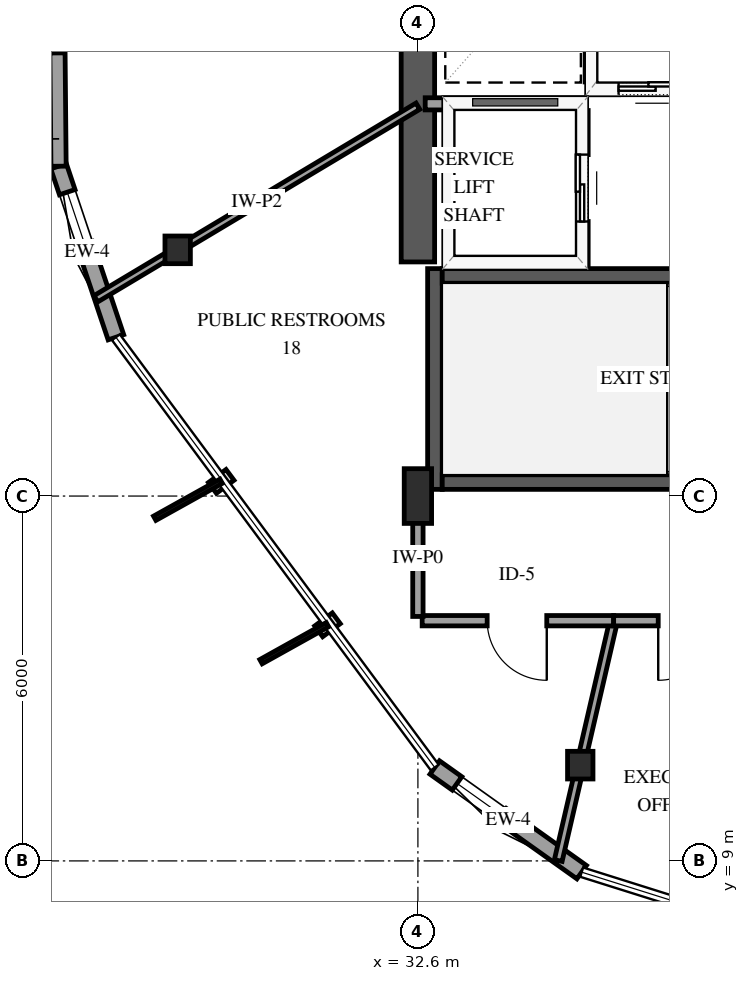
"""IFC4 building model, lengths in metres.
Left out: names, types, materials, properties, quantities, classifications, styles, units other than length and angle.
Written with IfcOpenShell. Run it as: python <this file> out.ifc"""

import sys

from ifc_helpers import new_model, si_unit, direction, frame, frame_2d, origin, origin_2d, place, context, subcontext, project, spatial, rectangle, i_section, extrude, element, fill, save


model = new_model("IFC4")
c1 = context("Model", 3, precision=1e-05, world=origin(), true_north=direction((0.0, 1.0)))
c2 = subcontext(c1, "Body", "Model", "MODEL_VIEW")
j1 = project(units=[si_unit("LENGTHUNIT", "METRE"), si_unit("PLANEANGLEUNIT", "RADIAN")], contexts=[c1])
p1 = place(None, origin())
s1 = spatial("IfcSite", under=j1, at=p1, CompositionType="ELEMENT")
p2 = place(p1, origin())
s2 = spatial("IfcBuilding", under=s1, at=p2, CompositionType="ELEMENT")
p3 = place(p2, frame((0.0, 0.0, 103.0)))
s3 = spatial("IfcBuildingStorey", under=s2, at=p3, CompositionType="ELEMENT", Elevation=103.0)
p4 = place(p3, frame((32.88, 15.11, 0.0), z_axis=(0.0, 0.0, 1.0), x_axis=(0.0, 1.0, 0.0)))
e1 = element("IfcWall", 1, at=p4, inside=s3, PredefinedType="SHEAR", context=c2, shape_type="SweptSolid", body=[
    extrude(rectangle(XDim=3.63, YDim=0.24, at=frame_2d((1.815, 0.0))), origin(), (0.0, 0.0, 1.0), 3.9),
])
for number, where, z_axis, x_axis in (
    (2, (33.0, 15.23, 0.0), (0.0, 0.0, 1.0), (1.0, 0.0, 0.0)),
    (3, (33.0, 18.62, 0.0), (0.0, 0.0, 1.0), (1.0, 0.0, 0.0)),
):
    element("IfcWall", number, at=place(p3, frame(where, z_axis=z_axis, x_axis=x_axis)), inside=s3, PredefinedType="SHEAR", context=c2, shape_type="SweptSolid", body=[
        extrude(rectangle(XDim=8.0, YDim=0.24, at=frame_2d((4.0, 0.0))), origin(), (0.0, 0.0, 1.0), 3.9),
    ])
p5 = place(p3, frame((32.6, 18.85, 0.0), z_axis=(0.0, 0.0, 1.0), x_axis=(0.0, 1.0, 0.0)))
e4 = element("IfcWall", 4, at=p5, inside=s3, PredefinedType="SHEAR", context=c2, shape_type="SweptSolid", body=[
    extrude(rectangle(XDim=12.3, YDim=0.55, at=frame_2d((6.15, 0.0))), origin(), (0.0, 0.0, 1.0), 3.9),
])
p6 = place(p3, frame((32.6, 15.0, 0.0), z_axis=(0.0, 0.0, 1.0), x_axis=(1.0, 0.0, 0.0)))
e5 = element("IfcColumn", 5, at=p6, inside=s3, PredefinedType="PILASTER", context=c2, shape_type="SweptSolid", body=[
    extrude(rectangle(XDim=0.45, YDim=0.9, at=origin_2d()), origin(), (0.0, 0.0, 1.0), 3.9),
])
for number, where, z_axis, x_axis in (
    (6, (28.649, 19.049, 0.0), (0.0, 0.0, 1.0), (1.0, 0.0, 0.0)),
    (7, (35.27, 10.575, 0.0), (0.0, 0.0, 1.0), (1.0, 0.0, 0.0)),
):
    element("IfcColumn", number, at=place(p3, frame(where, z_axis=z_axis, x_axis=x_axis)), inside=s3, PredefinedType="COLUMN", context=c2, shape_type="SweptSolid", body=[
        extrude(i_section(OverallWidth=0.418, OverallDepth=0.455, WebThickness=0.042, FlangeThickness=0.068, FilletRadius=0.038, at=origin_2d()), origin(), (0.0, 0.0, 1.0), 3.9),
    ])
p7 = place(p3, frame((26.69, 20.424, 0.0), z_axis=(0.0, 0.0, 1.0), x_axis=(0.317980066672, -0.948097398583, 0.0)))
e8 = element("IfcWall", 8, at=p7, inside=s3, PredefinedType="SOLIDWALL", context=c2, shape_type="SweptSolid", body=[
    extrude(rectangle(XDim=2.967, YDim=0.27, at=frame_2d((1.483, 0.0))), origin(), (0.0, 0.0, 1.0), 2.979),
])
p8 = place(p7, frame((0.45, 0.0, 0.75)))
e9 = element("IfcOpeningElement", 9, at=p8, cuts=e8, PredefinedType="OPENING", context=c2, shape_type="SweptSolid", body=[
    extrude(rectangle(XDim=0.9, YDim=1.5, at=frame_2d((0.45, 0.75))), frame((0.0, 0.145, 0.0), z_axis=(0.0, -1.0, 0.0), x_axis=(1.0, 0.0, 0.0)), (0.0, 0.0, 1.0), 0.29),
])
p9 = place(p3, frame((26.607, 29.23, 0.0), z_axis=(0.0, 0.0, 1.0), x_axis=(0.009425958451, -0.999955574667, 0.0)))
e10 = element("IfcWall", 10, at=p9, inside=s3, PredefinedType="SOLIDWALL", context=c2, shape_type="SweptSolid", body=[
    extrude(rectangle(XDim=8.806, YDim=0.25, at=frame_2d((4.403, 0.0))), origin(), (0.0, 0.0, 1.0), 2.979),
])
p10 = place(p9, frame((3.903, 0.0, 0.0)))
e11 = element("IfcOpeningElement", 11, at=p10, cuts=e10, PredefinedType="OPENING", context=c2, shape_type="SweptSolid", body=[
    extrude(rectangle(XDim=1.05, YDim=2.15, at=frame_2d((0.525, 1.075))), frame((0.0, 0.135, 0.0), z_axis=(0.0, -1.0, 0.0), x_axis=(1.0, 0.0, 0.0)), (0.0, 0.0, 1.0), 0.27),
])
p11 = place(p9, frame((0.44, 0.0, 0.72)))
e12 = element("IfcOpeningElement", 12, at=p11, cuts=e10, PredefinedType="OPENING", context=c2, shape_type="SweptSolid", body=[
    extrude(rectangle(XDim=1.35, YDim=1.65, at=frame_2d((0.675, 0.825))), frame((0.0, 0.135, 0.0), z_axis=(0.0, -1.0, 0.0), x_axis=(1.0, 0.0, 0.0)), (0.0, 0.0, 1.0), 0.27),
])
p12 = place(p9, frame((5.593, 0.0, 0.72)))
e13 = element("IfcOpeningElement", 13, at=p12, cuts=e10, PredefinedType="OPENING", context=c2, shape_type="SweptSolid", body=[
    extrude(rectangle(XDim=1.35, YDim=1.65, at=frame_2d((0.675, 0.825))), frame((0.0, 0.135, 0.0), z_axis=(0.0, -1.0, 0.0), x_axis=(1.0, 0.0, 0.0)), (0.0, 0.0, 1.0), 0.27),
])
p13 = place(p3, frame((32.877, 10.536, 0.0), z_axis=(0.0, 0.0, 1.0), x_axis=(0.814483465487, -0.580186766867, 0.0)))
e14 = element("IfcWall", 14, at=p13, inside=s3, PredefinedType="SOLIDWALL", context=c2, shape_type="SweptSolid", body=[
    extrude(rectangle(XDim=2.967, YDim=0.27, at=frame_2d((1.483, 0.0))), origin(), (0.0, 0.0, 1.0), 2.979),
])
p14 = place(p13, frame((0.45, 0.0, 0.75)))
e15 = element("IfcOpeningElement", 15, at=p14, cuts=e14, PredefinedType="OPENING", context=c2, shape_type="SweptSolid", body=[
    extrude(rectangle(XDim=0.9, YDim=1.5, at=frame_2d((0.45, 0.75))), frame((0.0, 0.145, 0.0), z_axis=(0.0, -1.0, 0.0), x_axis=(1.0, 0.0, 0.0)), (0.0, 0.0, 1.0), 0.29),
])
p15 = place(p3, frame((35.45, 21.7, 0.0), z_axis=(0.0, 0.0, 1.0), x_axis=(1.0, 0.0, 0.0)))
e16 = element("IfcWall", 16, at=p15, inside=s3, PredefinedType="SOLIDWALL", context=c2, shape_type="SweptSolid", body=[
    extrude(rectangle(XDim=2.0, YDim=0.2, at=frame_2d((1.0, 0.0))), origin(), (0.0, 0.0, 1.0), 3.6),
])
p16 = place(p15, frame((0.45, 0.0, 0.0)))
e17 = element("IfcOpeningElement", 17, at=p16, cuts=e16, PredefinedType="OPENING", context=c2, shape_type="SweptSolid", body=[
    extrude(rectangle(XDim=1.1, YDim=2.15, at=frame_2d((0.55, 1.075))), frame((0.0, 0.11, 0.0), z_axis=(0.0, -1.0, 0.0), x_axis=(1.0, 0.0, 0.0)), (0.0, 0.0, 1.0), 0.22),
])
p17 = place(p3, frame((35.45, 21.81, 0.0), z_axis=(0.0, 0.0, 1.0), x_axis=(0.0, 1.0, 0.0)))
e18 = element("IfcWall", 18, at=p17, inside=s3, PredefinedType="SOLIDWALL", context=c2, shape_type="SweptSolid", body=[
    extrude(rectangle(XDim=2.38, YDim=0.2, at=frame_2d((1.19, 0.0))), origin(), (0.0, 0.0, 1.0), 3.6),
])
p18 = place(p3, frame((32.72, 21.45, 0.0), z_axis=(0.0, 0.0, 1.0), x_axis=(1.0, 0.0, 0.0)))
e19 = element("IfcWall", 19, at=p18, inside=s3, PredefinedType="SOLIDWALL", context=c2, shape_type="SweptSolid", body=[
    extrude(rectangle(XDim=2.58, YDim=0.2, at=frame_2d((1.29, 0.0))), origin(), (0.0, 0.0, 1.0), 3.6),
])
p19 = place(p3, frame((35.3, 18.79, 0.0), z_axis=(0.0, 0.0, 1.0), x_axis=(0.0, 1.0, 0.0)))
e20 = element("IfcWall", 20, at=p19, inside=s3, PredefinedType="SOLIDWALL", context=c2, shape_type="SweptSolid", body=[
    extrude(rectangle(XDim=2.55, YDim=0.2, at=frame_2d((1.275, 0.0))), origin(), (0.0, 0.0, 1.0), 3.6),
])
p20 = place(p19, frame((0.725, 0.0, 0.0)))
e21 = element("IfcOpeningElement", 21, at=p20, cuts=e20, PredefinedType="OPENING", context=c2, shape_type="SweptSolid", body=[
    extrude(rectangle(XDim=1.1, YDim=2.15, at=frame_2d((0.55, 1.075))), frame((0.0, 0.11, 0.0), z_axis=(0.0, -1.0, 0.0), x_axis=(1.0, 0.0, 0.0)), (0.0, 0.0, 1.0), 0.22),
])
p21 = place(p3, frame((32.6, 21.411, 0.0), z_axis=(0.0, 0.0, 1.0), x_axis=(-0.85825649037, -0.513221001848, 0.0)))
e22 = element("IfcWall", 22, at=p21, inside=s3, PredefinedType="PARTITIONING", context=c2, shape_type="SweptSolid", body=[
    extrude(rectangle(XDim=6.171, YDim=0.12, at=frame_2d((3.085, 0.0))), origin(), (0.0, 0.0, 1.0), 3.6),
])
p22 = place(p3, frame((35.819, 12.95, 0.0), z_axis=(0.0, 0.0, 1.0), x_axis=(-0.22509737341, -0.974336272795, 0.0)))
e23 = element("IfcWall", 23, at=p22, inside=s3, PredefinedType="PARTITIONING", context=c2, shape_type="SweptSolid", body=[
    extrude(rectangle(XDim=4.048, YDim=0.13, at=frame_2d((2.024, 0.0))), origin(), (0.0, 0.0, 1.0), 2.895),
])
p23 = place(p3, frame((35.819, 12.95, 0.0), z_axis=(0.0, 0.0, 1.0), x_axis=(-1.0, 0.0, 0.0)))
e24 = element("IfcWall", 24, at=p23, inside=s3, PredefinedType="PARTITIONING", context=c2, shape_type="SweptSolid", body=[
    extrude(rectangle(XDim=3.149, YDim=0.17, at=frame_2d((1.575, 0.0))), origin(), (0.0, 0.0, 1.0), 3.6),
])
p24 = place(p23, frame((1.1, 0.0, 0.0)))
e25 = element("IfcOpeningElement", 25, at=p24, cuts=e24, PredefinedType="OPENING", context=c2, shape_type="SweptSolid", body=[
    extrude(rectangle(XDim=0.98, YDim=2.15, at=frame_2d((0.49, 1.075))), frame((0.0, 0.095, 0.0), z_axis=(0.0, -1.0, 0.0), x_axis=(1.0, 0.0, 0.0)), (0.0, 0.0, 1.0), 0.19),
])
p25 = place(p3, frame((38.294, 12.95, 0.0), z_axis=(0.0, 0.0, 1.0), x_axis=(-1.0, 0.0, 0.0)))
e26 = element("IfcWall", 26, at=p25, inside=s3, PredefinedType="PARTITIONING", context=c2, shape_type="SweptSolid", body=[
    extrude(rectangle(XDim=2.475, YDim=0.17, at=frame_2d((1.237, 0.0))), origin(), (0.0, 0.0, 1.0), 3.6),
])
p26 = place(p25, frame((0.762, 0.0, 0.0)))
e27 = element("IfcOpeningElement", 27, at=p26, cuts=e26, PredefinedType="OPENING", context=c2, shape_type="SweptSolid", body=[
    extrude(rectangle(XDim=0.98, YDim=2.15, at=frame_2d((0.49, 1.075))), frame((0.0, 0.095, 0.0), z_axis=(0.0, -1.0, 0.0), x_axis=(1.0, 0.0, 0.0)), (0.0, 0.0, 1.0), 0.19),
])
p27 = place(p3, frame((32.6, 13.02, 0.0), z_axis=(0.0, 0.0, 1.0), x_axis=(0.0, 1.0, 0.0)))
e28 = element("IfcWall", 28, at=p27, inside=s3, PredefinedType="PARTITIONING", context=c2, shape_type="SweptSolid", body=[
    extrude(rectangle(XDim=1.91, YDim=0.17, at=frame_2d((0.955, 0.0))), origin(), (0.0, 0.0, 1.0), 3.6),
])
p28 = place(p8, origin())
e29 = element("IfcWindow", 29, at=p28, inside=s3, PartitioningType="SINGLE_PANEL", PredefinedType="WINDOW", context=c2, shape_type="SweptSolid", body=[
    extrude(rectangle(XDim=0.9, YDim=1.5, at=frame_2d((0.45, 0.75))), frame((0.0, 0.03, 0.0), z_axis=(0.0, -1.0, 0.0), x_axis=(1.0, 0.0, 0.0)), (0.0, 0.0, 1.0), 0.06),
])
fill(e9, e29)
p29 = place(p12, origin())
e30 = element("IfcWindow", 30, at=p29, inside=s3, PartitioningType="SINGLE_PANEL", PredefinedType="WINDOW", context=c2, shape_type="SweptSolid", body=[
    extrude(rectangle(XDim=1.35, YDim=1.65, at=frame_2d((0.675, 0.825))), frame((0.0, 0.03, 0.0), z_axis=(0.0, -1.0, 0.0), x_axis=(1.0, 0.0, 0.0)), (0.0, 0.0, 1.0), 0.06),
])
fill(e13, e30)
p30 = place(p14, origin())
e31 = element("IfcWindow", 31, at=p30, inside=s3, PartitioningType="SINGLE_PANEL", PredefinedType="WINDOW", context=c2, shape_type="SweptSolid", body=[
    extrude(rectangle(XDim=0.9, YDim=1.5, at=frame_2d((0.45, 0.75))), frame((0.0, 0.03, 0.0), z_axis=(0.0, -1.0, 0.0), x_axis=(1.0, 0.0, 0.0)), (0.0, 0.0, 1.0), 0.06),
])
fill(e15, e31)
p31 = place(p16, origin())
e32 = element("IfcDoor", 32, at=p31, inside=s3, OperationType="SLIDING_TO_LEFT", PredefinedType="DOOR", context=c2, shape_type="SweptSolid", body=[
    extrude(rectangle(XDim=1.1, YDim=2.15, at=frame_2d((0.55, 1.075))), frame((0.0, 0.025, 0.0), z_axis=(0.0, -1.0, 0.0), x_axis=(1.0, 0.0, 0.0)), (0.0, 0.0, 1.0), 0.05),
])
fill(e17, e32)
p32 = place(p20, origin())
e33 = element("IfcDoor", 33, at=p32, inside=s3, OperationType="SLIDING_TO_LEFT", PredefinedType="DOOR", context=c2, shape_type="SweptSolid", body=[
    extrude(rectangle(XDim=1.1, YDim=2.15, at=frame_2d((0.55, 1.075))), frame((0.0, 0.025, 0.0), z_axis=(0.0, -1.0, 0.0), x_axis=(1.0, 0.0, 0.0)), (0.0, 0.0, 1.0), 0.05),
])
fill(e21, e33)
p33 = place(p24, origin())
e34 = element("IfcDoor", 34, at=p33, inside=s3, OperationType="SINGLE_SWING_LEFT", PredefinedType="DOOR", context=c2, shape_type="SweptSolid", body=[
    extrude(rectangle(XDim=0.98, YDim=2.15, at=frame_2d((0.49, 1.075))), frame((0.0, 0.025, 0.0), z_axis=(0.0, -1.0, 0.0), x_axis=(1.0, 0.0, 0.0)), (0.0, 0.0, 1.0), 0.05),
])
fill(e25, e34)
p34 = place(p26, origin())
e35 = element("IfcDoor", 35, at=p34, inside=s3, OperationType="SINGLE_SWING_RIGHT", PredefinedType="DOOR", context=c2, shape_type="SweptSolid", body=[
    extrude(rectangle(XDim=0.98, YDim=2.15, at=frame_2d((0.49, 1.075))), frame((0.0, 0.025, 0.0), z_axis=(0.0, -1.0, 0.0), x_axis=(1.0, 0.0, 0.0)), (0.0, 0.0, 1.0), 0.05),
])
fill(e27, e35)
save(model, sys.argv[1])
